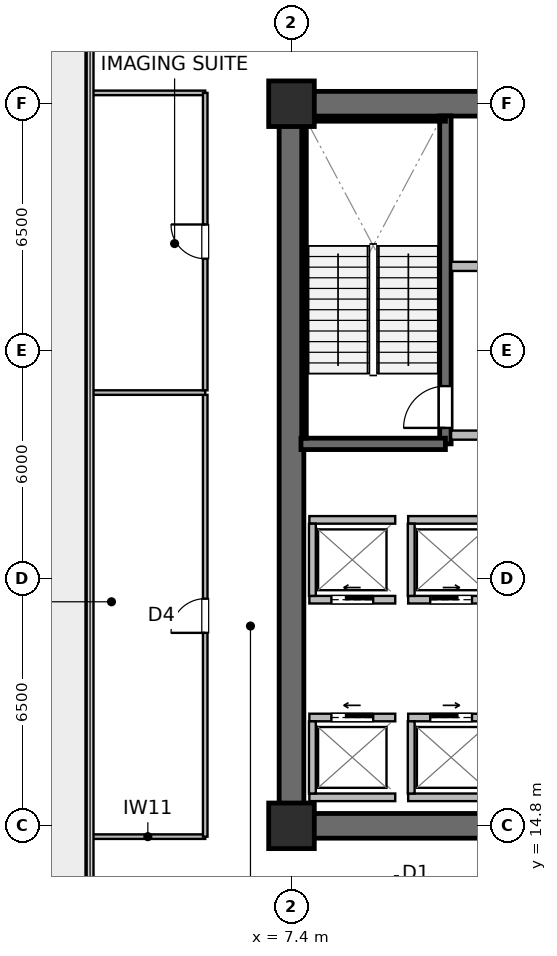
"""IFC4 building model, lengths in metres.
Left out: names, types, materials, properties, quantities, classifications, styles, units other than length and angle.
Written with IfcOpenShell. Run it as: python <this file> out.ifc"""

import sys

from ifc_helpers import new_model, si_unit, direction, frame, frame_2d, origin, origin_2d, place, context, subcontext, project, spatial, rectangle, extrude, source, transform, mapped, element, fill, save


model = new_model("IFC4")
c1 = context("Model", 3, precision=1e-05, world=origin(), true_north=direction((0.0, 1.0)))
c2 = subcontext(c1, "Body", "Model", "MODEL_VIEW")
j1 = project(units=[si_unit("LENGTHUNIT", "METRE"), si_unit("PLANEANGLEUNIT", "RADIAN")], contexts=[c1])
p1 = place(None, origin())
s1 = spatial("IfcSite", under=j1, at=p1, CompositionType="ELEMENT")
p2 = place(p1, origin())
s2 = spatial("IfcBuilding", under=s1, at=p2, CompositionType="ELEMENT")
p3 = place(p2, frame((0.0, 0.0, 100.3)))
s3 = spatial("IfcBuildingStorey", under=s2, at=p3, CompositionType="ELEMENT", Elevation=100.3)
p4 = place(p3, frame((7.075, 14.8, 0.0), z_axis=(0.0, 0.0, 1.0), x_axis=(1.0, 0.0, 0.0)))
e1 = element("IfcWall", 1, at=p4, inside=s3, PredefinedType="SHEAR", context=c2, shape_type="SweptSolid", body=[
    extrude(rectangle(XDim=15.45, YDim=0.65, at=frame_2d((7.725, 0.0))), origin(), (0.0, 0.0, 1.0), 4.49),
])
p5 = place(p3, frame((7.075, 33.8, 0.0), z_axis=(0.0, 0.0, 1.0), x_axis=(1.0, 0.0, 0.0)))
e2 = element("IfcWall", 2, at=p5, inside=s3, PredefinedType="SHEAR", context=c2, shape_type="SweptSolid", body=[
    extrude(rectangle(XDim=15.45, YDim=0.65, at=frame_2d((7.725, 0.0))), origin(), (0.0, 0.0, 1.0), 4.49),
])
p6 = place(p5, frame((5.675, 0.0, 0.0)))
e3 = element("IfcOpeningElement", 3, at=p6, cuts=e2, PredefinedType="OPENING", context=c2, shape_type="SweptSolid", body=[
    extrude(rectangle(XDim=0.95, YDim=2.15, at=frame_2d((0.475, 1.075))), frame((0.0, 0.335, 0.0), z_axis=(0.0, -1.0, 0.0), x_axis=(1.0, 0.0, 0.0)), (0.0, 0.0, 1.0), 0.67),
])
p7 = place(p5, frame((9.04, 0.0, 0.0)))
e4 = element("IfcOpeningElement", 4, at=p7, cuts=e2, PredefinedType="OPENING", context=c2, shape_type="SweptSolid", body=[
    extrude(rectangle(XDim=0.95, YDim=2.15, at=frame_2d((0.475, 1.075))), frame((0.0, 0.335, 0.0), z_axis=(0.0, -1.0, 0.0), x_axis=(1.0, 0.0, 0.0)), (0.0, 0.0, 1.0), 0.67),
])
p8 = place(p5, frame((12.44, 0.0, 0.0)))
e5 = element("IfcOpeningElement", 5, at=p8, cuts=e2, PredefinedType="OPENING", context=c2, shape_type="SweptSolid", body=[
    extrude(rectangle(XDim=0.95, YDim=2.15, at=frame_2d((0.475, 1.075))), frame((0.0, 0.335, 0.0), z_axis=(0.0, -1.0, 0.0), x_axis=(1.0, 0.0, 0.0)), (0.0, 0.0, 1.0), 0.67),
])
p9 = place(p3, frame((7.4, 15.125, 0.0), z_axis=(0.0, 0.0, 1.0), x_axis=(0.0, 1.0, 0.0)))
e6 = element("IfcWall", 6, at=p9, inside=s3, PredefinedType="SHEAR", context=c2, shape_type="SweptSolid", body=[
    extrude(rectangle(XDim=18.35, YDim=0.65, at=frame_2d((9.175, 0.0))), origin(), (0.0, 0.0, 1.0), 4.49),
])
p10 = place(p3, frame((11.45, 24.85, 0.0), z_axis=(0.0, 0.0, 1.0), x_axis=(0.0, 1.0, 0.0)))
e7 = element("IfcWall", 7, at=p10, inside=s3, PredefinedType="SHEAR", context=c2, shape_type="SweptSolid", body=[
    extrude(rectangle(XDim=8.63, YDim=0.3, at=frame_2d((4.315, 0.0))), origin(), (0.0, 0.0, 1.0), 4.49),
])
p11 = place(p10, frame((0.42, 0.0, 0.0)))
e8 = element("IfcOpeningElement", 8, at=p11, cuts=e7, PredefinedType="OPENING", context=c2, shape_type="SweptSolid", body=[
    extrude(rectangle(XDim=1.1, YDim=2.15, at=frame_2d((0.55, 1.075))), frame((0.0, 0.16, 0.0), z_axis=(0.0, -1.0, 0.0), x_axis=(1.0, 0.0, 0.0)), (0.0, 0.0, 1.0), 0.32),
])
p12 = place(p3, frame((7.65, 24.85, 0.0), z_axis=(0.0, 0.0, 1.0), x_axis=(1.0, 0.0, 0.0)))
e9 = element("IfcWall", 9, at=p12, inside=s3, PredefinedType="SHEAR", context=c2, shape_type="SweptSolid", body=[
    extrude(rectangle(XDim=3.8, YDim=0.3, at=frame_2d((1.9, 0.0))), origin(), (0.0, 0.0, 1.0), 4.49),
])
p13 = place(p3, frame((7.73, 33.4, 0.0), z_axis=(0.0, 0.0, 1.0), x_axis=(1.0, 0.0, 0.0)))
e10 = element("IfcWall", 10, at=p13, inside=s3, PredefinedType="SOLIDWALL", context=c2, shape_type="SweptSolid", body=[
    extrude(rectangle(XDim=3.72, YDim=0.12, at=frame_2d((1.86, 0.0))), origin(), (0.0, 0.0, 1.0), 4.49),
])
p14 = place(p3, frame((7.73, 25.0, 0.0), z_axis=(0.0, 0.0, 1.0), x_axis=(0.0, 1.0, 0.0)))
e11 = element("IfcWall", 11, at=p14, inside=s3, PredefinedType="SOLIDWALL", context=c2, shape_type="SweptSolid", body=[
    extrude(rectangle(XDim=8.32, YDim=0.12, at=frame_2d((4.16, 0.0))), origin(), (0.0, 0.0, 1.0), 4.49),
])
m1 = source(origin(), c2, "Body", "SweptSolid", [
    extrude(rectangle(XDim=1.2, YDim=1.2, at=origin_2d()), origin(), (0.0, 0.0, 1.0), 4.8),
])
for number, where, z_axis, x_axis in (
    (12, (7.4, 14.8, 0.0), (0.0, 0.0, 1.0), (1.0, 0.0, 0.0)),
    (13, (7.4, 33.8, 0.0), (0.0, 0.0, 1.0), (1.0, 0.0, 0.0)),
):
    element("IfcColumn", number, at=place(p3, frame(where, z_axis=z_axis, x_axis=x_axis)), inside=s3, PredefinedType="COLUMN", context=c2, shape_type="MappedRepresentation", body=[
        mapped(m1, transform((0.0, 0.0, 0.0), scale=1.0)),
    ])
p15 = place(p3, frame((11.6, 25.08, 0.0), z_axis=(0.0, 0.0, 1.0), x_axis=(1.0, 0.0, 0.0)))
e14 = element("IfcWall", 14, at=p15, inside=s3, PredefinedType="SOLIDWALL", context=c2, shape_type="SweptSolid", body=[
    extrude(rectangle(XDim=6.92, YDim=0.24, at=frame_2d((3.46, 0.0))), origin(), (0.0, 0.0, 1.0), 3.825),
])
p16 = place(p15, frame((2.6, 0.0, 0.0)))
e15 = element("IfcOpeningElement", 15, at=p16, cuts=e14, PredefinedType="OPENING", context=c2, shape_type="SweptSolid", body=[
    extrude(rectangle(XDim=1.2, YDim=2.16, at=frame_2d((0.6, 1.08))), frame((0.0, 0.13, 0.0), z_axis=(0.0, -1.0, 0.0), x_axis=(1.0, 0.0, 0.0)), (0.0, 0.0, 1.0), 0.26),
])
p17 = place(p3, frame((11.6, 29.52, 0.0), z_axis=(0.0, 0.0, 1.0), x_axis=(1.0, 0.0, 0.0)))
e16 = element("IfcWall", 16, at=p17, inside=s3, PredefinedType="SOLIDWALL", context=c2, shape_type="SweptSolid", body=[
    extrude(rectangle(XDim=6.92, YDim=0.24, at=frame_2d((3.46, 0.0))), origin(), (0.0, 0.0, 1.0), 3.825),
])
p18 = place(p3, frame((7.87, 17.65, 0.0), z_axis=(0.0, 0.0, 1.0), x_axis=(1.0, 0.0, 0.0)))
e17 = element("IfcWall", 17, at=p18, inside=s3, PredefinedType="SOLIDWALL", context=c2, shape_type="SweptSolid", body=[
    extrude(rectangle(XDim=2.26, YDim=0.2, at=frame_2d((1.13, 0.0))), origin(), (0.0, 0.0, 1.0), 4.49),
])
p19 = place(p18, frame((0.58, 0.0, 0.0)))
e18 = element("IfcOpeningElement", 18, at=p19, cuts=e17, PredefinedType="OPENING", context=c2, shape_type="SweptSolid", body=[
    extrude(rectangle(XDim=1.1, YDim=2.22, at=frame_2d((0.55, 1.11))), frame((0.0, 0.11, 0.0), z_axis=(0.0, -1.0, 0.0), x_axis=(1.0, 0.0, 0.0)), (0.0, 0.0, 1.0), 0.22),
])
p20 = place(p3, frame((7.87, 15.55, 0.0), z_axis=(0.0, 0.0, 1.0), x_axis=(1.0, 0.0, 0.0)))
e19 = element("IfcWall", 19, at=p20, inside=s3, PredefinedType="SOLIDWALL", context=c2, shape_type="SweptSolid", body=[
    extrude(rectangle(XDim=2.26, YDim=0.2, at=frame_2d((1.13, 0.0))), origin(), (0.0, 0.0, 1.0), 4.49),
])
p21 = place(p3, frame((7.95, 15.65, 0.0), z_axis=(0.0, 0.0, 1.0), x_axis=(0.0, 1.0, 0.0)))
e20 = element("IfcWall", 20, at=p21, inside=s3, PredefinedType="SOLIDWALL", context=c2, shape_type="SweptSolid", body=[
    extrude(rectangle(XDim=1.9, YDim=0.18, at=frame_2d((0.95, 0.0))), origin(), (0.0, 0.0, 1.0), 4.49),
])
p22 = place(p3, frame((10.47, 17.65, 0.0), z_axis=(0.0, 0.0, 1.0), x_axis=(1.0, 0.0, 0.0)))
e21 = element("IfcWall", 21, at=p22, inside=s3, PredefinedType="SOLIDWALL", context=c2, shape_type="SweptSolid", body=[
    extrude(rectangle(XDim=2.26, YDim=0.2, at=frame_2d((1.13, 0.0))), origin(), (0.0, 0.0, 1.0), 4.49),
])
p23 = place(p22, frame((0.58, 0.0, 0.0)))
e22 = element("IfcOpeningElement", 22, at=p23, cuts=e21, PredefinedType="OPENING", context=c2, shape_type="SweptSolid", body=[
    extrude(rectangle(XDim=1.1, YDim=2.22, at=frame_2d((0.55, 1.11))), frame((0.0, 0.11, 0.0), z_axis=(0.0, -1.0, 0.0), x_axis=(1.0, 0.0, 0.0)), (0.0, 0.0, 1.0), 0.22),
])
p24 = place(p3, frame((10.47, 15.55, 0.0), z_axis=(0.0, 0.0, 1.0), x_axis=(1.0, 0.0, 0.0)))
e23 = element("IfcWall", 23, at=p24, inside=s3, PredefinedType="SOLIDWALL", context=c2, shape_type="SweptSolid", body=[
    extrude(rectangle(XDim=2.26, YDim=0.2, at=frame_2d((1.13, 0.0))), origin(), (0.0, 0.0, 1.0), 4.49),
])
p25 = place(p3, frame((10.55, 15.65, 0.0), z_axis=(0.0, 0.0, 1.0), x_axis=(0.0, 1.0, 0.0)))
e24 = element("IfcWall", 24, at=p25, inside=s3, PredefinedType="SOLIDWALL", context=c2, shape_type="SweptSolid", body=[
    extrude(rectangle(XDim=1.9, YDim=0.18, at=frame_2d((0.95, 0.0))), origin(), (0.0, 0.0, 1.0), 4.49),
])
p26 = place(p3, frame((7.87, 20.75, 0.0), z_axis=(0.0, 0.0, 1.0), x_axis=(1.0, 0.0, 0.0)))
e25 = element("IfcWall", 25, at=p26, inside=s3, PredefinedType="SOLIDWALL", context=c2, shape_type="SweptSolid", body=[
    extrude(rectangle(XDim=2.26, YDim=0.2, at=frame_2d((1.13, 0.0))), origin(), (0.0, 0.0, 1.0), 4.49),
])
p27 = place(p26, frame((0.58, 0.0, 0.0)))
e26 = element("IfcOpeningElement", 26, at=p27, cuts=e25, PredefinedType="OPENING", context=c2, shape_type="SweptSolid", body=[
    extrude(rectangle(XDim=1.1, YDim=2.22, at=frame_2d((0.55, 1.11))), frame((0.0, 0.11, 0.0), z_axis=(0.0, -1.0, 0.0), x_axis=(1.0, 0.0, 0.0)), (0.0, 0.0, 1.0), 0.22),
])
p28 = place(p3, frame((7.87, 22.85, 0.0), z_axis=(0.0, 0.0, 1.0), x_axis=(1.0, 0.0, 0.0)))
e27 = element("IfcWall", 27, at=p28, inside=s3, PredefinedType="SOLIDWALL", context=c2, shape_type="SweptSolid", body=[
    extrude(rectangle(XDim=2.26, YDim=0.2, at=frame_2d((1.13, 0.0))), origin(), (0.0, 0.0, 1.0), 4.49),
])
p29 = place(p3, frame((7.95, 20.85, 0.0), z_axis=(0.0, 0.0, 1.0), x_axis=(0.0, 1.0, 0.0)))
e28 = element("IfcWall", 28, at=p29, inside=s3, PredefinedType="SOLIDWALL", context=c2, shape_type="SweptSolid", body=[
    extrude(rectangle(XDim=1.9, YDim=0.18, at=frame_2d((0.95, 0.0))), origin(), (0.0, 0.0, 1.0), 4.49),
])
p30 = place(p3, frame((10.47, 20.75, 0.0), z_axis=(0.0, 0.0, 1.0), x_axis=(1.0, 0.0, 0.0)))
e29 = element("IfcWall", 29, at=p30, inside=s3, PredefinedType="SOLIDWALL", context=c2, shape_type="SweptSolid", body=[
    extrude(rectangle(XDim=2.26, YDim=0.2, at=frame_2d((1.13, 0.0))), origin(), (0.0, 0.0, 1.0), 4.49),
])
p31 = place(p30, frame((0.58, 0.0, 0.0)))
e30 = element("IfcOpeningElement", 30, at=p31, cuts=e29, PredefinedType="OPENING", context=c2, shape_type="SweptSolid", body=[
    extrude(rectangle(XDim=1.1, YDim=2.22, at=frame_2d((0.55, 1.11))), frame((0.0, 0.11, 0.0), z_axis=(0.0, -1.0, 0.0), x_axis=(1.0, 0.0, 0.0)), (0.0, 0.0, 1.0), 0.22),
])
p32 = place(p3, frame((10.47, 22.85, 0.0), z_axis=(0.0, 0.0, 1.0), x_axis=(1.0, 0.0, 0.0)))
e31 = element("IfcWall", 31, at=p32, inside=s3, PredefinedType="SOLIDWALL", context=c2, shape_type="SweptSolid", body=[
    extrude(rectangle(XDim=2.26, YDim=0.2, at=frame_2d((1.13, 0.0))), origin(), (0.0, 0.0, 1.0), 4.49),
])
p33 = place(p3, frame((10.55, 20.85, 0.0), z_axis=(0.0, 0.0, 1.0), x_axis=(0.0, 1.0, 0.0)))
e32 = element("IfcWall", 32, at=p33, inside=s3, PredefinedType="SOLIDWALL", context=c2, shape_type="SweptSolid", body=[
    extrude(rectangle(XDim=1.9, YDim=0.18, at=frame_2d((0.95, 0.0))), origin(), (0.0, 0.0, 1.0), 4.49),
])
for number, where, z_axis, x_axis in (
    (33, (2.11, 14.515, 0.0), (0.0, 0.0, 1.0), (1.0, 0.0, 0.0)),
    (34, (2.11, 34.085, 0.0), (0.0, 0.0, 1.0), (1.0, 0.0, 0.0)),
):
    element("IfcWall", number, at=place(p3, frame(where, z_axis=z_axis, x_axis=x_axis)), inside=s3, PredefinedType="PARTITIONING", context=c2, shape_type="SweptSolid", body=[
        extrude(rectangle(XDim=3.02, YDim=0.12, at=frame_2d((1.51, 0.0))), origin(), (0.0, 0.0, 1.0), 4.49),
    ])
p34 = place(p3, frame((5.13, 14.515, 0.0), z_axis=(0.0, 0.0, 1.0), x_axis=(0.0, 1.0, 0.0)))
e35 = element("IfcWall", 35, at=p34, inside=s3, PredefinedType="PARTITIONING", context=c2, shape_type="SweptSolid", body=[
    extrude(rectangle(XDim=11.625, YDim=0.12, at=frame_2d((5.812, 0.0))), origin(), (0.0, 0.0, 1.0), 4.49),
])
p35 = place(p34, frame((5.363, 0.0, 0.0)))
e36 = element("IfcOpeningElement", 36, at=p35, cuts=e35, PredefinedType="OPENING", context=c2, shape_type="SweptSolid", body=[
    extrude(rectangle(XDim=0.9, YDim=2.1, at=frame_2d((0.45, 1.05))), frame((0.0, 0.07, 0.0), z_axis=(0.0, -1.0, 0.0), x_axis=(1.0, 0.0, 0.0)), (0.0, 0.0, 1.0), 0.14),
])
p36 = place(p3, frame((2.11, 26.2, 0.0), z_axis=(0.0, 0.0, 1.0), x_axis=(1.0, 0.0, 0.0)))
e37 = element("IfcWall", 37, at=p36, inside=s3, PredefinedType="PARTITIONING", context=c2, shape_type="SweptSolid", body=[
    extrude(rectangle(XDim=3.02, YDim=0.12, at=frame_2d((1.51, 0.0))), origin(), (0.0, 0.0, 1.0), 4.49),
])
p37 = place(p3, frame((5.13, 26.26, 0.0), z_axis=(0.0, 0.0, 1.0), x_axis=(0.0, 1.0, 0.0)))
e38 = element("IfcWall", 38, at=p37, inside=s3, PredefinedType="PARTITIONING", context=c2, shape_type="SweptSolid", body=[
    extrude(rectangle(XDim=7.825, YDim=0.12, at=frame_2d((3.913, 0.0))), origin(), (0.0, 0.0, 1.0), 4.49),
])
p38 = place(p37, frame((3.462, 0.0, 0.0)))
e39 = element("IfcOpeningElement", 39, at=p38, cuts=e38, PredefinedType="OPENING", context=c2, shape_type="SweptSolid", body=[
    extrude(rectangle(XDim=0.9, YDim=2.1, at=frame_2d((0.45, 1.05))), frame((0.0, 0.07, 0.0), z_axis=(0.0, -1.0, 0.0), x_axis=(1.0, 0.0, 0.0)), (0.0, 0.0, 1.0), 0.14),
])
m2 = source(origin(), c2, "Body", "SweptSolid", [
    extrude(rectangle(XDim=1.1, YDim=2.15, at=frame_2d((0.55, 1.075))), frame((0.0, 0.025, 0.0), z_axis=(0.0, -1.0, 0.0), x_axis=(1.0, 0.0, 0.0)), (0.0, 0.0, 1.0), 0.05),
])
p39 = place(p11, origin())
e40 = element("IfcDoor", 40, at=p39, inside=s3, OperationType="SINGLE_SWING_LEFT", PredefinedType="DOOR", context=c2, shape_type="MappedRepresentation", body=[
    mapped(m2, transform((0.0, 0.0, 0.0), scale=1.0)),
])
fill(e8, e40)
m3 = source(origin(), c2, "Body", "SweptSolid", [
    extrude(rectangle(XDim=1.1, YDim=2.22, at=frame_2d((0.55, 1.11))), frame((0.0, 0.025, 0.0), z_axis=(0.0, -1.0, 0.0), x_axis=(1.0, 0.0, 0.0)), (0.0, 0.0, 1.0), 0.05),
])
p40 = place(p19, origin())
e41 = element("IfcDoor", 41, at=p40, inside=s3, OperationType="SLIDING_TO_LEFT", PredefinedType="USERDEFINED", context=c2, shape_type="MappedRepresentation", body=[
    mapped(m3, transform((0.0, 0.0, 0.0), scale=1.0)),
])
fill(e18, e41)
p41 = place(p23, origin())
e42 = element("IfcDoor", 42, at=p41, inside=s3, OperationType="SLIDING_TO_RIGHT", PredefinedType="USERDEFINED", context=c2, shape_type="MappedRepresentation", body=[
    mapped(m3, transform((0.0, 0.0, 0.0), scale=1.0)),
])
fill(e22, e42)
p42 = place(p27, origin())
e43 = element("IfcDoor", 43, at=p42, inside=s3, OperationType="SLIDING_TO_LEFT", PredefinedType="USERDEFINED", context=c2, shape_type="MappedRepresentation", body=[
    mapped(m3, transform((0.0, 0.0, 0.0), scale=1.0)),
])
fill(e26, e43)
p43 = place(p31, origin())
e44 = element("IfcDoor", 44, at=p43, inside=s3, OperationType="SLIDING_TO_RIGHT", PredefinedType="USERDEFINED", context=c2, shape_type="MappedRepresentation", body=[
    mapped(m3, transform((0.0, 0.0, 0.0), scale=1.0)),
])
fill(e30, e44)
m4 = source(origin(), c2, "Body", "SweptSolid", [
    extrude(rectangle(XDim=0.9, YDim=2.1, at=frame_2d((0.45, 1.05))), frame((0.0, 0.025, 0.0), z_axis=(0.0, -1.0, 0.0), x_axis=(1.0, 0.0, 0.0)), (0.0, 0.0, 1.0), 0.05),
])
p44 = place(p35, origin())
e45 = element("IfcDoor", 45, at=p44, inside=s3, OperationType="SINGLE_SWING_LEFT", PredefinedType="DOOR", context=c2, shape_type="MappedRepresentation", body=[
    mapped(m4, transform((0.0, 0.0, 0.0), scale=1.0)),
])
fill(e36, e45)
p45 = place(p38, origin())
e46 = element("IfcDoor", 46, at=p45, inside=s3, OperationType="SINGLE_SWING_RIGHT", PredefinedType="DOOR", context=c2, shape_type="MappedRepresentation", body=[
    mapped(m4, transform((0.0, 0.0, 0.0), scale=1.0)),
])
fill(e39, e46)
save(model, sys.argv[1])
